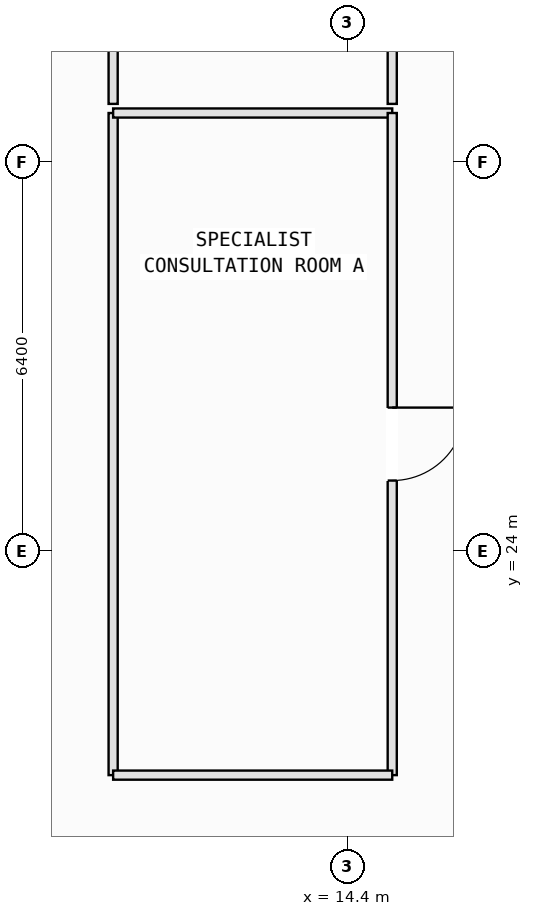
"""IFC4 building model, lengths in metres.
Left out: names, types, materials, properties, quantities, classifications, styles, units other than length and angle.
Written with IfcOpenShell. Run it as: python <this file> out.ifc"""

import sys

from ifc_helpers import new_model, si_unit, direction, frame, frame_2d, origin, place, context, subcontext, project, spatial, rectangle, extrude, element, fill, save


model = new_model("IFC4")
c1 = context("Model", 3, precision=1e-05, world=origin(), true_north=direction((0.0, 1.0)))
c2 = subcontext(c1, "Body", "Model", "MODEL_VIEW")
j1 = project(units=[si_unit("LENGTHUNIT", "METRE"), si_unit("PLANEANGLEUNIT", "RADIAN")], contexts=[c1])
p1 = place(None, origin())
s1 = spatial("IfcSite", under=j1, at=p1, CompositionType="ELEMENT")
p2 = place(p1, origin())
s2 = spatial("IfcBuilding", under=s1, at=p2, CompositionType="ELEMENT")
p3 = place(p2, frame((0.0, 0.0, 10.8)))
s3 = spatial("IfcBuildingStorey", under=s2, at=p3, CompositionType="ELEMENT", Elevation=10.8)
p4 = place(p3, frame((10.55, 20.31, 0.0), z_axis=(0.0, 0.0, 1.0), x_axis=(0.0, 1.0, 0.0)))
e1 = element("IfcWall", 1, at=p4, inside=s3, PredefinedType="PARTITIONING", context=c2, shape_type="SweptSolid", body=[
    extrude(rectangle(XDim=10.89, YDim=0.15, at=frame_2d((5.445, 0.0))), origin(), (0.0, 0.0, 1.0), 5.15),
])
p5 = place(p3, frame((10.55, 31.2, 0.0), z_axis=(0.0, 0.0, 1.0), x_axis=(1.0, 0.0, 0.0)))
e2 = element("IfcWall", 2, at=p5, inside=s3, PredefinedType="PARTITIONING", context=c2, shape_type="SweptSolid", body=[
    extrude(rectangle(XDim=4.59, YDim=0.15, at=frame_2d((2.295, 0.0))), origin(), (0.0, 0.0, 1.0), 5.15),
])
p6 = place(p3, frame((15.14, 31.2, 0.0), z_axis=(0.0, 0.0, 1.0), x_axis=(0.0, -1.0, 0.0)))
e3 = element("IfcWall", 3, at=p6, inside=s3, PredefinedType="PARTITIONING", context=c2, shape_type="SweptSolid", body=[
    extrude(rectangle(XDim=10.89, YDim=0.15, at=frame_2d((5.445, 0.0))), origin(), (0.0, 0.0, 1.0), 5.15),
])
p7 = place(p6, frame((4.845, 0.0, 0.0)))
e4 = element("IfcOpeningElement", 4, at=p7, cuts=e3, PredefinedType="OPENING", context=c2, shape_type="SweptSolid", body=[
    extrude(rectangle(XDim=1.2, YDim=2.15, at=frame_2d((0.6, 1.075))), frame((0.0, 0.085, 0.0), z_axis=(0.0, -1.0, 0.0), x_axis=(1.0, 0.0, 0.0)), (0.0, 0.0, 1.0), 0.17),
])
p8 = place(p3, frame((15.14, 20.31, 0.0), z_axis=(0.0, 0.0, 1.0), x_axis=(-1.0, 0.0, 0.0)))
e5 = element("IfcWall", 5, at=p8, inside=s3, PredefinedType="PARTITIONING", context=c2, shape_type="SweptSolid", body=[
    extrude(rectangle(XDim=4.59, YDim=0.15, at=frame_2d((2.295, 0.0))), origin(), (0.0, 0.0, 1.0), 5.15),
])
p9 = place(p3, frame((10.55, 31.35, 0.0), z_axis=(0.0, 0.0, 1.0), x_axis=(0.0, 1.0, 0.0)))
e6 = element("IfcWall", 6, at=p9, inside=s3, PredefinedType="PARTITIONING", context=c2, shape_type="SweptSolid", body=[
    extrude(rectangle(XDim=7.15, YDim=0.15, at=frame_2d((3.575, 0.0))), origin(), (0.0, 0.0, 1.0), 5.15),
])
p10 = place(p3, frame((15.14, 38.5, 0.0), z_axis=(0.0, 0.0, 1.0), x_axis=(0.0, -1.0, 0.0)))
e7 = element("IfcWall", 7, at=p10, inside=s3, PredefinedType="PARTITIONING", context=c2, shape_type="SweptSolid", body=[
    extrude(rectangle(XDim=7.15, YDim=0.15, at=frame_2d((3.575, 0.0))), origin(), (0.0, 0.0, 1.0), 5.15),
])
p11 = place(p10, frame((2.975, 0.0, 0.0)))
e8 = element("IfcOpeningElement", 8, at=p11, cuts=e7, PredefinedType="OPENING", context=c2, shape_type="SweptSolid", body=[
    extrude(rectangle(XDim=1.2, YDim=2.15, at=frame_2d((0.6, 1.075))), frame((0.0, 0.085, 0.0), z_axis=(0.0, -1.0, 0.0), x_axis=(1.0, 0.0, 0.0)), (0.0, 0.0, 1.0), 0.17),
])
p12 = place(p7, origin())
e9 = element("IfcDoor", 9, at=p12, inside=s3, OperationType="SINGLE_SWING_LEFT", PredefinedType="DOOR", context=c2, shape_type="SweptSolid", body=[
    extrude(rectangle(XDim=1.2, YDim=2.15, at=frame_2d((0.6, 1.075))), frame((0.0, 0.025, 0.0), z_axis=(0.0, -1.0, 0.0), x_axis=(1.0, 0.0, 0.0)), (0.0, 0.0, 1.0), 0.05),
])
fill(e4, e9)
save(model, sys.argv[1])
